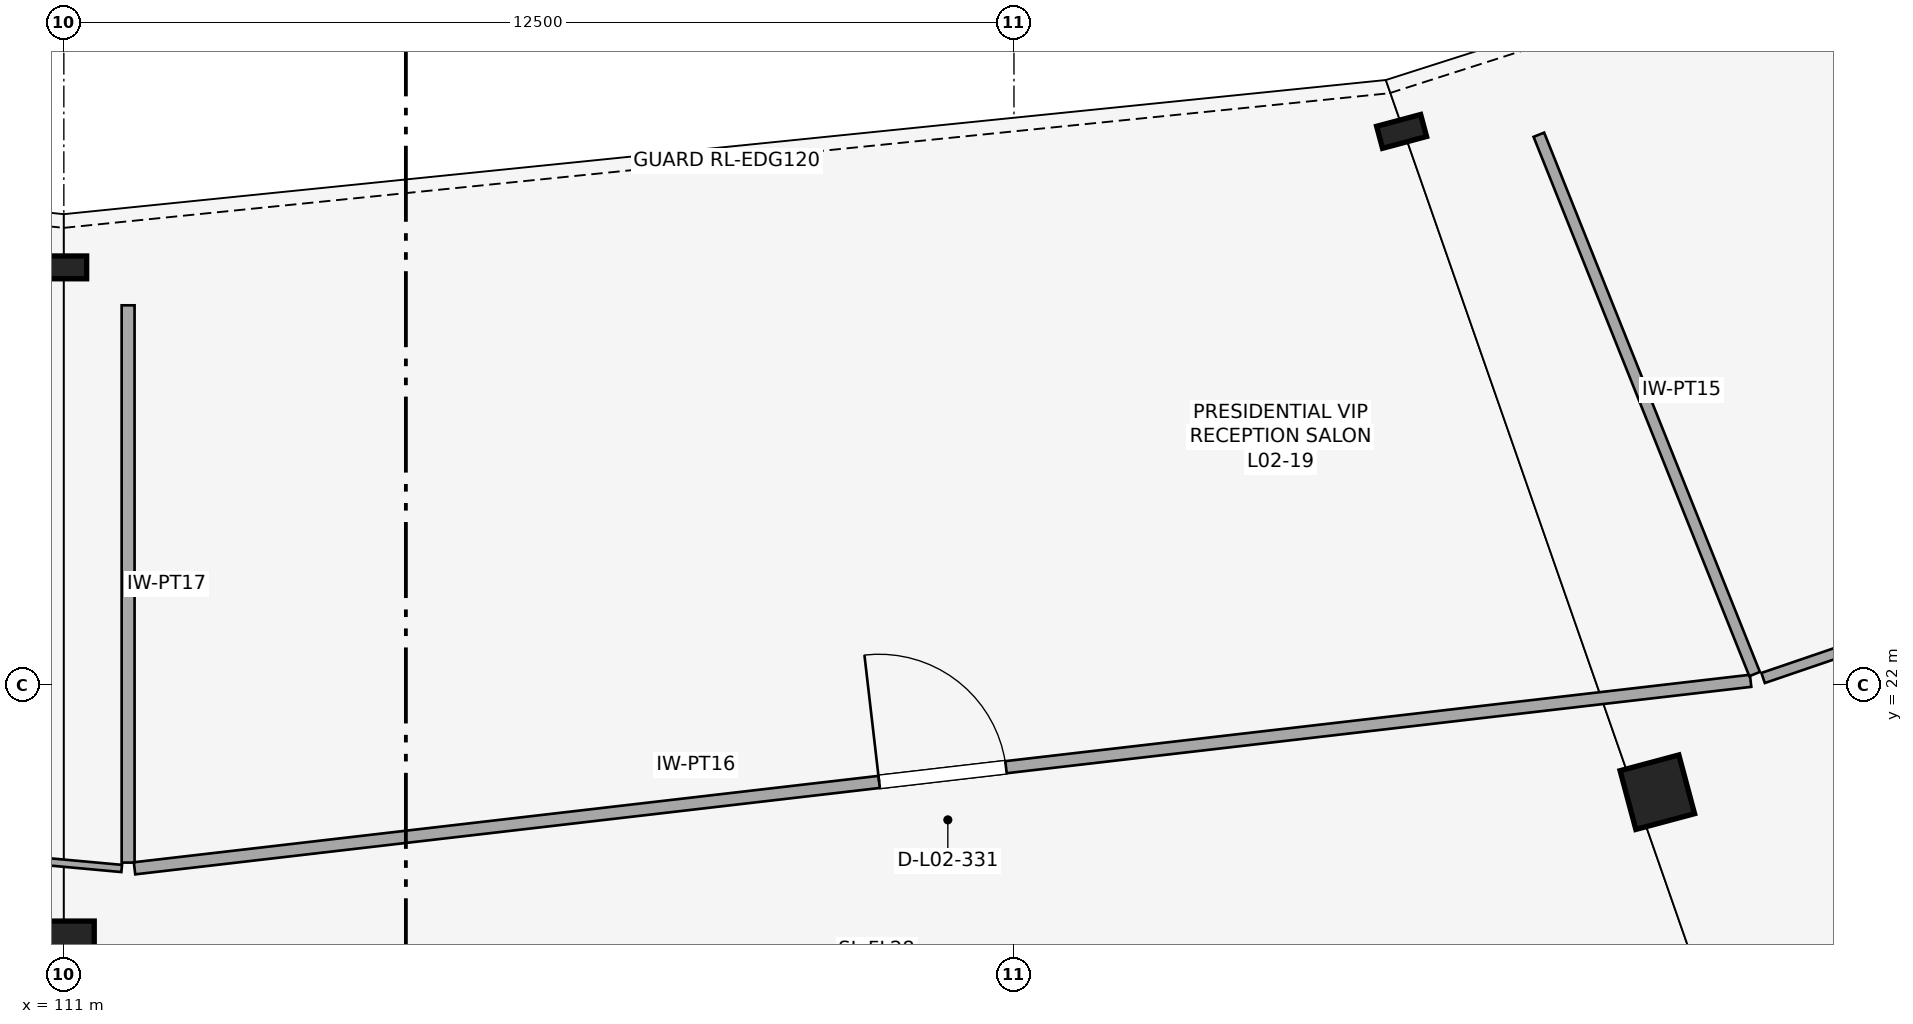
"""IFC4 building model, lengths in metres.
Left out: names, types, materials, properties, quantities, classifications, styles, units other than length and angle.
Written with IfcOpenShell. Run it as: python <this file> out.ifc"""

import sys

from ifc_helpers import new_model, si_unit, direction, frame, frame_2d, origin, origin_2d, place, context, subcontext, project, spatial, rectangle, i_section, extrude, element, fill, save


model = new_model("IFC4")
c1 = context("Model", 3, precision=1e-05, world=origin(), true_north=direction((0.0, 1.0)))
c2 = subcontext(c1, "Body", "Model", "MODEL_VIEW")
j1 = project(units=[si_unit("LENGTHUNIT", "METRE"), si_unit("PLANEANGLEUNIT", "RADIAN")], contexts=[c1])
p1 = place(None, origin())
s1 = spatial("IfcSite", under=j1, at=p1, CompositionType="ELEMENT")
p2 = place(p1, origin())
s2 = spatial("IfcBuilding", under=s1, at=p2, CompositionType="ELEMENT")
p3 = place(p2, frame((0.0, 0.0, 10.6)))
s3 = spatial("IfcBuildingStorey", under=s2, at=p3, CompositionType="ELEMENT", Elevation=10.6)
for number, where, z_axis, x_axis in (
    (1, (111.0, 27.5, 0.0), (0.0, 0.0, 1.0), (0.0, -1.0, 0.0)),
    (2, (128.6, 29.289, 0.0), (0.0, 0.0, 1.0), (0.259, -0.966, 0.0)),
):
    element("IfcColumn", number, at=place(p3, frame(where, z_axis=z_axis, x_axis=x_axis)), inside=s3, PredefinedType="COLUMN", context=c2, shape_type="SweptSolid", body=[
        extrude(i_section(OverallWidth=0.3, OverallDepth=0.6, WebThickness=0.015, FlangeThickness=0.03, FilletRadius=0.027, at=origin_2d()), origin(), (0.0, 0.0, 1.0), 5.0),
    ])
p4 = place(p3, frame((111.0, 18.5, -0.28), z_axis=(0.0, 0.0, 1.0), x_axis=(0.0, -1.0, 0.0)))
e3 = element("IfcColumn", 3, at=p4, inside=s3, PredefinedType="COLUMN", context=c2, shape_type="SweptSolid", body=[
    extrude(rectangle(XDim=0.8, YDim=0.8, at=origin_2d()), origin(), (0.0, 0.0, 1.0), 5.28),
])
p5 = place(p3, frame((131.964, 20.596, 0.0), z_axis=(0.0, 0.0, 1.0), x_axis=(0.258819045103, -0.965925826289, 0.0)))
e4 = element("IfcColumn", 4, at=p5, inside=s3, PredefinedType="COLUMN", context=c2, shape_type="SweptSolid", body=[
    extrude(rectangle(XDim=0.8, YDim=0.8, at=origin_2d()), origin(), (0.0, 0.0, 1.0), 5.0),
])
p6 = place(p3, frame((103.824, 20.316, 0.0), z_axis=(0.0, 0.0, 1.0), x_axis=(0.995864534593, -0.090850584695, 0.0)))
e5 = element("IfcWall", 5, at=p6, inside=s3, PredefinedType="MOVABLE", context=c2, shape_type="SweptSolid", body=[
    extrude(rectangle(XDim=7.97, YDim=0.095, at=frame_2d((3.985, 0.0))), origin(), (0.0, 0.0, 1.0), 3.47),
])
p7 = place(p6, frame((1.1, 0.0, 0.0)))
e6 = element("IfcOpeningElement", 6, at=p7, cuts=e5, PredefinedType="OPENING", context=c2, shape_type="SweptSolid", body=[
    extrude(rectangle(XDim=1.02, YDim=2.1, at=frame_2d((0.51, 1.05))), frame((0.0, 0.057, 0.0), z_axis=(0.0, -1.0, 0.0), x_axis=(1.0, 0.0, 0.0)), (0.0, 0.0, 1.0), 0.115),
])
p8 = place(p3, frame((111.846, 27.001, 0.0), z_axis=(0.0, 0.0, 1.0), x_axis=(0.0, -1.0, 0.0)))
e7 = element("IfcWall", 7, at=p8, inside=s3, PredefinedType="PARTITIONING", context=c2, shape_type="SweptSolid", body=[
    extrude(rectangle(XDim=7.332, YDim=0.17, at=frame_2d((3.666, 0.0))), origin(), (0.0, 0.0, 1.0), 3.47),
])
p9 = place(p3, frame((111.93, 19.594, 0.0), z_axis=(0.0, 0.0, 1.0), x_axis=(0.993336503718, 0.115250120956, 0.0)))
e8 = element("IfcWall", 8, at=p9, inside=s3, PredefinedType="PARTITIONING", context=c2, shape_type="SweptSolid", body=[
    extrude(rectangle(XDim=21.404, YDim=0.16, at=frame_2d((10.702, 0.0))), origin(), (0.0, 0.0, 1.0), 3.47),
])
p10 = place(p9, frame((9.862, 0.0, 0.0)))
e9 = element("IfcOpeningElement", 9, at=p10, cuts=e8, PredefinedType="OPENING", context=c2, shape_type="SweptSolid", body=[
    extrude(rectangle(XDim=1.68, YDim=2.38, at=frame_2d((0.84, 1.19))), frame((0.0, 0.09, 0.0), z_axis=(0.0, -1.0, 0.0), x_axis=(1.0, 0.0, 0.0)), (0.0, 0.0, 1.0), 0.18),
])
p11 = place(p3, frame((130.406, 29.245, 0.0), z_axis=(0.0, 0.0, 1.0), x_axis=(0.371412708479, -0.928467877732, 0.0)))
e10 = element("IfcWall", 10, at=p11, inside=s3, PredefinedType="PARTITIONING", context=c2, shape_type="SweptSolid", body=[
    extrude(rectangle(XDim=7.642, YDim=0.15, at=frame_2d((3.821, 0.0))), origin(), (0.0, 0.0, 1.0), 3.47),
])
p12 = place(p3, frame((133.356, 22.098, 0.0), z_axis=(0.0, 0.0, 1.0), x_axis=(0.946431250914, 0.322905384429, 0.0)))
e11 = element("IfcWall", 11, at=p12, inside=s3, PredefinedType="PARTITIONING", context=c2, shape_type="SweptSolid", body=[
    extrude(rectangle(XDim=20.552, YDim=0.14, at=frame_2d((10.276, 0.0))), origin(), (0.0, 0.0, 1.0), 3.47),
])
p13 = place(p12, frame((9.366, 0.0, 0.0)))
e12 = element("IfcOpeningElement", 12, at=p13, cuts=e11, PredefinedType="OPENING", context=c2, shape_type="SweptSolid", body=[
    extrude(rectangle(XDim=1.82, YDim=2.24, at=frame_2d((0.91, 1.12))), frame((0.0, 0.08, 0.0), z_axis=(0.0, -1.0, 0.0), x_axis=(1.0, 0.0, 0.0)), (0.0, 0.0, 1.0), 0.16),
])
p14 = place(p10, origin())
e13 = element("IfcDoor", 13, at=p14, inside=s3, OperationType="SINGLE_SWING_LEFT", PredefinedType="DOOR", context=c2, shape_type="SweptSolid", body=[
    extrude(rectangle(XDim=1.68, YDim=2.38, at=frame_2d((0.84, 1.19))), frame((0.0, 0.025, 0.0), z_axis=(0.0, -1.0, 0.0), x_axis=(1.0, 0.0, 0.0)), (0.0, 0.0, 1.0), 0.05),
])
fill(e9, e13)
save(model, sys.argv[1])
